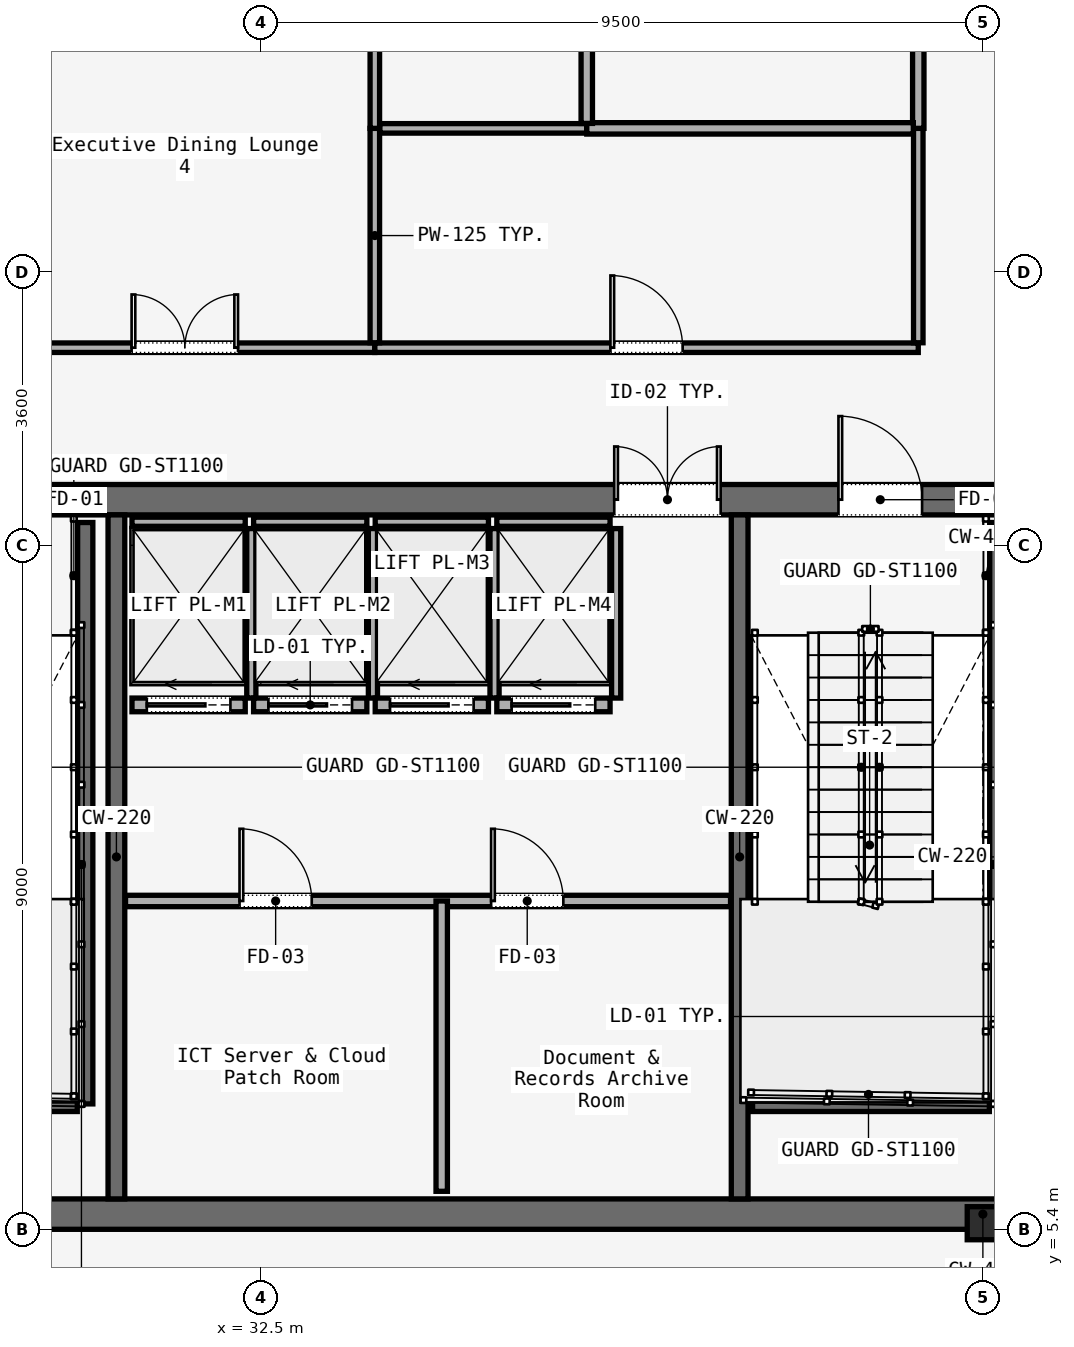
"""IFC4 building model, lengths in metres.
Left out: names, types, materials, properties, quantities, classifications, styles, units other than length and angle.
Written with IfcOpenShell. Run it as: python <this file> out.ifc"""

import sys

from ifc_helpers import new_model, si_unit, direction, frame, frame_2d, origin, origin_2d, place, context, subcontext, project, spatial, rectangle, i_section, extrude, element, fill, save


model = new_model("IFC4")
c1 = context("Model", 3, precision=1e-05, world=origin(), true_north=direction((0.0, 1.0)))
c2 = subcontext(c1, "Body", "Model", "MODEL_VIEW")
j1 = project(units=[si_unit("LENGTHUNIT", "METRE"), si_unit("PLANEANGLEUNIT", "RADIAN")], contexts=[c1])
p1 = place(None, origin())
s1 = spatial("IfcSite", under=j1, at=p1, CompositionType="ELEMENT")
p2 = place(p1, origin())
s2 = spatial("IfcBuilding", under=s1, at=p2, CompositionType="ELEMENT")
p3 = place(p2, frame((0.0, 0.0, 208.4)))
s3 = spatial("IfcBuildingStorey", under=s2, at=p3, CompositionType="ELEMENT", Elevation=208.4)
p4 = place(p3, frame((26.45, 15.0, 0.0), z_axis=(0.0, 0.0, 1.0), x_axis=(1.0, 0.0, 0.0)))
e1 = element("IfcWall", 1, at=p4, inside=s3, PredefinedType="SOLIDWALL", context=c2, shape_type="SweptSolid", body=[
    extrude(rectangle(XDim=31.1, YDim=0.4, at=frame_2d((15.55, 0.0))), origin(), (0.0, 0.0, 1.0), 4.52),
])
p5 = place(p4, frame((1.65, 0.0, 0.0)))
e2 = element("IfcOpeningElement", 2, at=p5, cuts=e1, PredefinedType="OPENING", context=c2, shape_type="SweptSolid", body=[
    extrude(rectangle(XDim=1.1, YDim=2.2, at=frame_2d((0.55, 1.1))), frame((0.0, 0.2, 0.0), z_axis=(0.0, -1.0, 0.0), x_axis=(1.0, 0.0, 0.0)), (0.0, 0.0, 1.0), 0.4),
])
p6 = place(p4, frame((13.65, 0.0, 0.0)))
e3 = element("IfcOpeningElement", 3, at=p6, cuts=e1, PredefinedType="OPENING", context=c2, shape_type="SweptSolid", body=[
    extrude(rectangle(XDim=1.1, YDim=2.2, at=frame_2d((0.55, 1.1))), frame((0.0, 0.2, 0.0), z_axis=(0.0, -1.0, 0.0), x_axis=(1.0, 0.0, 0.0)), (0.0, 0.0, 1.0), 0.4),
])
p7 = place(p4, frame((25.55, 0.0, 0.0)))
e4 = element("IfcOpeningElement", 4, at=p7, cuts=e1, PredefinedType="OPENING", context=c2, shape_type="SweptSolid", body=[
    extrude(rectangle(XDim=1.1, YDim=2.2, at=frame_2d((0.55, 1.1))), frame((0.0, 0.2, 0.0), z_axis=(0.0, -1.0, 0.0), x_axis=(1.0, 0.0, 0.0)), (0.0, 0.0, 1.0), 0.4),
])
p8 = place(p4, frame((10.7, 0.0, 0.0)))
e5 = element("IfcOpeningElement", 5, at=p8, cuts=e1, PredefinedType="OPENING", context=c2, shape_type="SweptSolid", body=[
    extrude(rectangle(XDim=1.4, YDim=2.2, at=frame_2d((0.7, 1.1))), frame((0.0, 0.2, 0.0), z_axis=(0.0, -1.0, 0.0), x_axis=(1.0, 0.0, 0.0)), (0.0, 0.0, 1.0), 0.4),
])
p9 = place(p4, frame((19.35, 0.0, 0.0)))
e6 = element("IfcOpeningElement", 6, at=p9, cuts=e1, PredefinedType="OPENING", context=c2, shape_type="SweptSolid", body=[
    extrude(rectangle(XDim=1.1, YDim=2.2, at=frame_2d((0.55, 1.1))), frame((0.0, 0.2, 0.0), z_axis=(0.0, -1.0, 0.0), x_axis=(1.0, 0.0, 0.0)), (0.0, 0.0, 1.0), 0.4),
])
p10 = place(p4, frame((21.4, 0.0, 0.0)))
e7 = element("IfcOpeningElement", 7, at=p10, cuts=e1, PredefinedType="OPENING", context=c2, shape_type="SweptSolid", body=[
    extrude(rectangle(XDim=0.9, YDim=2.1, at=frame_2d((0.45, 1.05))), frame((0.0, 0.2, 0.0), z_axis=(0.0, -1.0, 0.0), x_axis=(1.0, 0.0, 0.0)), (0.0, 0.0, 1.0), 0.4),
])
p11 = place(p4, frame((23.35, 0.0, 0.0)))
e8 = element("IfcOpeningElement", 8, at=p11, cuts=e1, PredefinedType="OPENING", context=c2, shape_type="SweptSolid", body=[
    extrude(rectangle(XDim=1.3, YDim=2.3, at=frame_2d((0.65, 1.15))), frame((0.0, 0.2, 0.0), z_axis=(0.0, -1.0, 0.0), x_axis=(1.0, 0.0, 0.0)), (0.0, 0.0, 1.0), 0.4),
])
p12 = place(p3, frame((26.45, 5.6, 0.0), z_axis=(0.0, 0.0, 1.0), x_axis=(1.0, 0.0, 0.0)))
e9 = element("IfcWall", 9, at=p12, inside=s3, PredefinedType="SOLIDWALL", context=c2, shape_type="SweptSolid", body=[
    extrude(rectangle(XDim=31.1, YDim=0.4, at=frame_2d((15.55, 0.0))), origin(), (0.0, 0.0, 1.0), 4.52),
])
for number, where, z_axis, x_axis in (
    (10, (30.6, 5.8, 0.0), (0.0, 0.0, 1.0), (0.0, 1.0, 0.0)),
    (11, (38.8, 5.8, 0.0), (0.0, 0.0, 1.0), (0.0, 1.0, 0.0)),
):
    element("IfcWall", number, at=place(p3, frame(where, z_axis=z_axis, x_axis=x_axis)), inside=s3, PredefinedType="SOLIDWALL", context=c2, shape_type="SweptSolid", body=[
        extrude(rectangle(XDim=9.0, YDim=0.22, at=frame_2d((4.5, 0.0))), origin(), (0.0, 0.0, 1.0), 4.52),
    ])
p13 = place(p3, frame((42.0, 5.48, 0.0), z_axis=(0.0, 0.0, 1.0), x_axis=(1.0, 0.0, 0.0)))
e12 = element("IfcColumn", 12, at=p13, inside=s3, PredefinedType="COLUMN", context=c2, shape_type="SweptSolid", body=[
    extrude(i_section(OverallWidth=0.412, OverallDepth=0.435, WebThickness=0.036, FlangeThickness=0.044, FilletRadius=0.015, at=origin_2d()), origin(), (0.0, 0.0, 1.0), 4.52),
])
p14 = place(p3, frame((30.19, 14.7, 0.0), z_axis=(0.0, 0.0, 1.0), x_axis=(0.0, -1.0, 0.0)))
e13 = element("IfcWall", 13, at=p14, inside=s3, PredefinedType="SOLIDWALL", context=c2, shape_type="SweptSolid", body=[
    extrude(rectangle(XDim=7.65, YDim=0.2, at=frame_2d((3.825, 0.0))), origin(), (0.0, 0.0, 1.0), 4.8),
])
p15 = place(p3, frame((26.97, 7.05, 0.0), z_axis=(0.0, 0.0, 1.0), x_axis=(1.0, 0.0, 0.0)))
e14 = element("IfcWall", 14, at=p15, inside=s3, PredefinedType="SOLIDWALL", context=c2, shape_type="SweptSolid", body=[
    extrude(rectangle(XDim=3.115, YDim=0.2, at=frame_2d((1.558, 0.0))), origin(), (0.0, 0.0, 1.0), 4.8),
])
p16 = place(p3, frame((42.19, 14.7, 0.0), z_axis=(0.0, 0.0, 1.0), x_axis=(0.0, -1.0, 0.0)))
e15 = element("IfcWall", 15, at=p16, inside=s3, PredefinedType="SOLIDWALL", context=c2, shape_type="SweptSolid", body=[
    extrude(rectangle(XDim=7.65, YDim=0.2, at=frame_2d((3.825, 0.0))), origin(), (0.0, 0.0, 1.0), 4.8),
])
p17 = place(p3, frame((38.97, 7.05, 0.0), z_axis=(0.0, 0.0, 1.0), x_axis=(1.0, 0.0, 0.0)))
e16 = element("IfcWall", 16, at=p17, inside=s3, PredefinedType="SOLIDWALL", context=c2, shape_type="SweptSolid", body=[
    extrude(rectangle(XDim=3.115, YDim=0.2, at=frame_2d((1.558, 0.0))), origin(), (0.0, 0.0, 1.0), 4.8),
])
p18 = place(p3, frame((30.72, 9.72, 0.0), z_axis=(0.0, 0.0, 1.0), x_axis=(1.0, 0.0, 0.0)))
e17 = element("IfcWall", 17, at=p18, inside=s3, PredefinedType="PARTITIONING", context=c2, shape_type="SweptSolid", body=[
    extrude(rectangle(XDim=7.96, YDim=0.15, at=frame_2d((3.98, 0.0))), origin(), (0.0, 0.0, 1.0), 3.39),
])
p19 = place(p18, frame((1.5, 0.0, 0.0)))
e18 = element("IfcOpeningElement", 18, at=p19, cuts=e17, PredefinedType="OPENING", context=c2, shape_type="SweptSolid", body=[
    extrude(rectangle(XDim=0.95, YDim=2.2, at=frame_2d((0.475, 1.1))), frame((0.0, 0.075, 0.0), z_axis=(0.0, -1.0, 0.0), x_axis=(1.0, 0.0, 0.0)), (0.0, 0.0, 1.0), 0.15),
])
p20 = place(p18, frame((4.81, 0.0, 0.0)))
e19 = element("IfcOpeningElement", 19, at=p20, cuts=e17, PredefinedType="OPENING", context=c2, shape_type="SweptSolid", body=[
    extrude(rectangle(XDim=0.95, YDim=2.2, at=frame_2d((0.475, 1.1))), frame((0.0, 0.075, 0.0), z_axis=(0.0, -1.0, 0.0), x_axis=(1.0, 0.0, 0.0)), (0.0, 0.0, 1.0), 0.15),
])
p21 = place(p3, frame((34.88, 5.9, 0.0), z_axis=(0.0, 0.0, 1.0), x_axis=(0.0, 1.0, 0.0)))
e20 = element("IfcWall", 20, at=p21, inside=s3, PredefinedType="PARTITIONING", context=c2, shape_type="SweptSolid", body=[
    extrude(rectangle(XDim=3.82, YDim=0.15, at=frame_2d((1.91, 0.0))), origin(), (0.0, 0.0, 1.0), 3.39),
])
p22 = place(p3, frame((30.805, 12.3, 0.0), z_axis=(0.0, 0.0, 1.0), x_axis=(1.0, 0.0, 0.0)))
e21 = element("IfcWall", 21, at=p22, inside=s3, PredefinedType="SOLIDWALL", context=c2, shape_type="SweptSolid", body=[
    extrude(rectangle(XDim=1.49, YDim=0.18, at=frame_2d((0.745, 0.0))), origin(), (0.0, 0.0, 1.0), 3.39),
])
p23 = place(p22, frame((0.195, 0.0, 0.0)))
e22 = element("IfcOpeningElement", 22, at=p23, cuts=e21, PredefinedType="OPENING", context=c2, shape_type="SweptSolid", body=[
    extrude(rectangle(XDim=1.1, YDim=2.2, at=frame_2d((0.55, 1.1))), frame((0.0, 0.09, 0.0), z_axis=(0.0, -1.0, 0.0), x_axis=(1.0, 0.0, 0.0)), (0.0, 0.0, 1.0), 0.18),
])
p24 = place(p3, frame((30.805, 14.71, 0.0), z_axis=(0.0, 0.0, 1.0), x_axis=(1.0, 0.0, 0.0)))
e23 = element("IfcWall", 23, at=p24, inside=s3, PredefinedType="SOLIDWALL", context=c2, shape_type="SweptSolid", body=[
    extrude(rectangle(XDim=1.49, YDim=0.12, at=frame_2d((0.745, 0.0))), origin(), (0.0, 0.0, 1.0), 3.39),
])
p25 = place(p3, frame((32.375, 12.39, 0.0), z_axis=(0.0, 0.0, 1.0), x_axis=(0.0, 1.0, 0.0)))
e24 = element("IfcWall", 24, at=p25, inside=s3, PredefinedType="SOLIDWALL", context=c2, shape_type="SweptSolid", body=[
    extrude(rectangle(XDim=2.23, YDim=0.12, at=frame_2d((1.115, 0.0))), origin(), (0.0, 0.0, 1.0), 3.39),
])
p26 = place(p3, frame((32.405, 12.3, 0.0), z_axis=(0.0, 0.0, 1.0), x_axis=(1.0, 0.0, 0.0)))
e25 = element("IfcWall", 25, at=p26, inside=s3, PredefinedType="SOLIDWALL", context=c2, shape_type="SweptSolid", body=[
    extrude(rectangle(XDim=1.49, YDim=0.18, at=frame_2d((0.745, 0.0))), origin(), (0.0, 0.0, 1.0), 3.39),
])
p27 = place(p26, frame((0.195, 0.0, 0.0)))
e26 = element("IfcOpeningElement", 26, at=p27, cuts=e25, PredefinedType="OPENING", context=c2, shape_type="SweptSolid", body=[
    extrude(rectangle(XDim=1.1, YDim=2.2, at=frame_2d((0.55, 1.1))), frame((0.0, 0.09, 0.0), z_axis=(0.0, -1.0, 0.0), x_axis=(1.0, 0.0, 0.0)), (0.0, 0.0, 1.0), 0.18),
])
p28 = place(p3, frame((32.405, 14.71, 0.0), z_axis=(0.0, 0.0, 1.0), x_axis=(1.0, 0.0, 0.0)))
e27 = element("IfcWall", 27, at=p28, inside=s3, PredefinedType="SOLIDWALL", context=c2, shape_type="SweptSolid", body=[
    extrude(rectangle(XDim=1.49, YDim=0.12, at=frame_2d((0.745, 0.0))), origin(), (0.0, 0.0, 1.0), 3.39),
])
p29 = place(p3, frame((33.975, 12.39, 0.0), z_axis=(0.0, 0.0, 1.0), x_axis=(0.0, 1.0, 0.0)))
e28 = element("IfcWall", 28, at=p29, inside=s3, PredefinedType="SOLIDWALL", context=c2, shape_type="SweptSolid", body=[
    extrude(rectangle(XDim=2.23, YDim=0.12, at=frame_2d((1.115, 0.0))), origin(), (0.0, 0.0, 1.0), 3.39),
])
p30 = place(p3, frame((34.005, 12.3, 0.0), z_axis=(0.0, 0.0, 1.0), x_axis=(1.0, 0.0, 0.0)))
e29 = element("IfcWall", 29, at=p30, inside=s3, PredefinedType="SOLIDWALL", context=c2, shape_type="SweptSolid", body=[
    extrude(rectangle(XDim=1.49, YDim=0.18, at=frame_2d((0.745, 0.0))), origin(), (0.0, 0.0, 1.0), 3.39),
])
p31 = place(p30, frame((0.195, 0.0, 0.0)))
e30 = element("IfcOpeningElement", 30, at=p31, cuts=e29, PredefinedType="OPENING", context=c2, shape_type="SweptSolid", body=[
    extrude(rectangle(XDim=1.1, YDim=2.2, at=frame_2d((0.55, 1.1))), frame((0.0, 0.09, 0.0), z_axis=(0.0, -1.0, 0.0), x_axis=(1.0, 0.0, 0.0)), (0.0, 0.0, 1.0), 0.18),
])
p32 = place(p3, frame((34.005, 14.71, 0.0), z_axis=(0.0, 0.0, 1.0), x_axis=(1.0, 0.0, 0.0)))
e31 = element("IfcWall", 31, at=p32, inside=s3, PredefinedType="SOLIDWALL", context=c2, shape_type="SweptSolid", body=[
    extrude(rectangle(XDim=1.49, YDim=0.12, at=frame_2d((0.745, 0.0))), origin(), (0.0, 0.0, 1.0), 3.39),
])
p33 = place(p3, frame((35.575, 12.39, 0.0), z_axis=(0.0, 0.0, 1.0), x_axis=(0.0, 1.0, 0.0)))
e32 = element("IfcWall", 32, at=p33, inside=s3, PredefinedType="SOLIDWALL", context=c2, shape_type="SweptSolid", body=[
    extrude(rectangle(XDim=2.23, YDim=0.12, at=frame_2d((1.115, 0.0))), origin(), (0.0, 0.0, 1.0), 3.39),
])
p34 = place(p3, frame((35.605, 12.3, 0.0), z_axis=(0.0, 0.0, 1.0), x_axis=(1.0, 0.0, 0.0)))
e33 = element("IfcWall", 33, at=p34, inside=s3, PredefinedType="SOLIDWALL", context=c2, shape_type="SweptSolid", body=[
    extrude(rectangle(XDim=1.49, YDim=0.18, at=frame_2d((0.745, 0.0))), origin(), (0.0, 0.0, 1.0), 3.39),
])
p35 = place(p34, frame((0.195, 0.0, 0.0)))
e34 = element("IfcOpeningElement", 34, at=p35, cuts=e33, PredefinedType="OPENING", context=c2, shape_type="SweptSolid", body=[
    extrude(rectangle(XDim=1.1, YDim=2.2, at=frame_2d((0.55, 1.1))), frame((0.0, 0.09, 0.0), z_axis=(0.0, -1.0, 0.0), x_axis=(1.0, 0.0, 0.0)), (0.0, 0.0, 1.0), 0.18),
])
p36 = place(p3, frame((35.605, 14.71, 0.0), z_axis=(0.0, 0.0, 1.0), x_axis=(1.0, 0.0, 0.0)))
e35 = element("IfcWall", 35, at=p36, inside=s3, PredefinedType="SOLIDWALL", context=c2, shape_type="SweptSolid", body=[
    extrude(rectangle(XDim=1.49, YDim=0.12, at=frame_2d((0.745, 0.0))), origin(), (0.0, 0.0, 1.0), 3.39),
])
p37 = place(p3, frame((37.175, 12.39, 0.0), z_axis=(0.0, 0.0, 1.0), x_axis=(0.0, 1.0, 0.0)))
e36 = element("IfcWall", 36, at=p37, inside=s3, PredefinedType="SOLIDWALL", context=c2, shape_type="SweptSolid", body=[
    extrude(rectangle(XDim=2.23, YDim=0.12, at=frame_2d((1.115, 0.0))), origin(), (0.0, 0.0, 1.0), 3.39),
])
p38 = place(p3, frame((29.0, 17.0, 0.0), z_axis=(0.0, 0.0, 1.0), x_axis=(1.0, 0.0, 0.0)))
e37 = element("IfcWall", 37, at=p38, inside=s3, PredefinedType="PARTITIONING", context=c2, shape_type="SweptSolid", body=[
    extrude(rectangle(XDim=5.0, YDim=0.125, at=frame_2d((2.5, 0.0))), origin(), (0.0, 0.0, 1.0), 3.39),
])
p39 = place(p38, frame((1.8, 0.0, 0.0)))
e38 = element("IfcOpeningElement", 38, at=p39, cuts=e37, PredefinedType="OPENING", context=c2, shape_type="SweptSolid", body=[
    extrude(rectangle(XDim=1.4, YDim=2.2, at=frame_2d((0.7, 1.1))), frame((0.0, 0.062, 0.0), z_axis=(0.0, -1.0, 0.0), x_axis=(1.0, 0.0, 0.0)), (0.0, 0.0, 1.0), 0.125),
])
p40 = place(p3, frame((34.0, 17.0, 0.0), z_axis=(0.0, 0.0, 1.0), x_axis=(1.0, 0.0, 0.0)))
e39 = element("IfcWall", 39, at=p40, inside=s3, PredefinedType="PARTITIONING", context=c2, shape_type="SweptSolid", body=[
    extrude(rectangle(XDim=7.15, YDim=0.125, at=frame_2d((3.575, 0.0))), origin(), (0.0, 0.0, 1.0), 3.39),
])
p41 = place(p40, frame((3.1, 0.0, 0.0)))
e40 = element("IfcOpeningElement", 40, at=p41, cuts=e39, PredefinedType="OPENING", context=c2, shape_type="SweptSolid", body=[
    extrude(rectangle(XDim=0.95, YDim=2.2, at=frame_2d((0.475, 1.1))), frame((0.0, 0.062, 0.0), z_axis=(0.0, -1.0, 0.0), x_axis=(1.0, 0.0, 0.0)), (0.0, 0.0, 1.0), 0.125),
])
p42 = place(p3, frame((41.15, 17.065, 0.0), z_axis=(0.0, 0.0, 1.0), x_axis=(0.0, 1.0, 0.0)))
e41 = element("IfcWall", 41, at=p42, inside=s3, PredefinedType="PARTITIONING", context=c2, shape_type="SweptSolid", body=[
    extrude(rectangle(XDim=2.821, YDim=0.125, at=frame_2d((1.411, 0.0))), origin(), (0.0, 0.0, 1.0), 3.39),
])
p43 = place(p3, frame((41.15, 19.886, 0.0), z_axis=(0.0, 0.0, 1.0), x_axis=(0.0, 1.0, 0.0)))
e42 = element("IfcWall", 42, at=p43, inside=s3, PredefinedType="PARTITIONING", context=c2, shape_type="SweptSolid", body=[
    extrude(rectangle(XDim=4.514, YDim=0.15, at=frame_2d((2.257, 0.0))), origin(), (0.0, 0.0, 1.0), 3.39),
])
p44 = place(p43, frame((1.807, 0.0, 0.0)))
e43 = element("IfcOpeningElement", 43, at=p44, cuts=e42, PredefinedType="OPENING", context=c2, shape_type="SweptSolid", body=[
    extrude(rectangle(XDim=0.9, YDim=2.15, at=frame_2d((0.45, 1.075))), frame((0.0, 0.075, 0.0), z_axis=(0.0, -1.0, 0.0), x_axis=(1.0, 0.0, 0.0)), (0.0, 0.0, 1.0), 0.15),
])
p45 = place(p3, frame((34.0, 17.065, 0.0), z_axis=(0.0, 0.0, 1.0), x_axis=(0.0, 1.0, 0.0)))
e44 = element("IfcWall", 44, at=p45, inside=s3, PredefinedType="PARTITIONING", context=c2, shape_type="SweptSolid", body=[
    extrude(rectangle(XDim=2.821, YDim=0.125, at=frame_2d((1.411, 0.0))), origin(), (0.0, 0.0, 1.0), 3.39),
])
p46 = place(p3, frame((34.065, 19.886, 0.0), z_axis=(0.0, 0.0, 1.0), x_axis=(1.0, 0.0, 0.0)))
e45 = element("IfcWall", 45, at=p46, inside=s3, PredefinedType="PARTITIONING", context=c2, shape_type="SweptSolid", body=[
    extrude(rectangle(XDim=2.724, YDim=0.125, at=frame_2d((1.362, 0.0))), origin(), (0.0, 0.0, 1.0), 3.39),
])
p47 = place(p3, frame((36.789, 19.886, 0.0), z_axis=(0.0, 0.0, 1.0), x_axis=(1.0, 0.0, 0.0)))
e46 = element("IfcWall", 46, at=p47, inside=s3, PredefinedType="PARTITIONING", context=c2, shape_type="SweptSolid", body=[
    extrude(rectangle(XDim=4.296, YDim=0.15, at=frame_2d((2.148, 0.0))), origin(), (0.0, 0.0, 1.0), 3.39),
])
p48 = place(p3, frame((34.0, 21.075, 0.0), z_axis=(0.0, 0.0, 1.0), x_axis=(0.0, -1.0, 0.0)))
e47 = element("IfcWall", 47, at=p48, inside=s3, PredefinedType="PARTITIONING", context=c2, shape_type="SweptSolid", body=[
    extrude(rectangle(XDim=1.189, YDim=0.125, at=frame_2d((0.594, 0.0))), origin(), (0.0, 0.0, 1.0), 3.39),
])
p49 = place(p3, frame((36.789, 24.335, 0.0), z_axis=(0.0, 0.0, 1.0), x_axis=(0.0, -1.0, 0.0)))
e48 = element("IfcWall", 48, at=p49, inside=s3, PredefinedType="PARTITIONING", context=c2, shape_type="SweptSolid", body=[
    extrude(rectangle(XDim=4.384, YDim=0.15, at=frame_2d((2.192, 0.0))), origin(), (0.0, 0.0, 1.0), 3.39),
])
p50 = place(p6, origin())
e49 = element("IfcDoor", 49, at=p50, inside=s3, OperationType="SINGLE_SWING_RIGHT", PredefinedType="DOOR", context=c2, shape_type="SweptSolid", body=[
    extrude(rectangle(XDim=1.1, YDim=2.2, at=frame_2d((0.55, 1.1))), frame((0.0, 0.025, 0.0), z_axis=(0.0, -1.0, 0.0), x_axis=(1.0, 0.0, 0.0)), (0.0, 0.0, 1.0), 0.05),
])
fill(e3, e49)
p51 = place(p8, origin())
e50 = element("IfcDoor", 50, at=p51, inside=s3, OperationType="DOUBLE_DOOR_SINGLE_SWING", PredefinedType="DOOR", context=c2, shape_type="SweptSolid", body=[
    extrude(rectangle(XDim=1.4, YDim=2.2, at=frame_2d((0.7, 1.1))), frame((0.0, 0.025, 0.0), z_axis=(0.0, -1.0, 0.0), x_axis=(1.0, 0.0, 0.0)), (0.0, 0.0, 1.0), 0.05),
])
fill(e5, e50)
p52 = place(p19, origin())
e51 = element("IfcDoor", 51, at=p52, inside=s3, OperationType="SINGLE_SWING_LEFT", PredefinedType="DOOR", context=c2, shape_type="SweptSolid", body=[
    extrude(rectangle(XDim=0.95, YDim=2.2, at=frame_2d((0.475, 1.1))), frame((0.0, 0.025, 0.0), z_axis=(0.0, -1.0, 0.0), x_axis=(1.0, 0.0, 0.0)), (0.0, 0.0, 1.0), 0.05),
])
fill(e18, e51)
p53 = place(p20, origin())
e52 = element("IfcDoor", 52, at=p53, inside=s3, OperationType="SINGLE_SWING_RIGHT", PredefinedType="DOOR", context=c2, shape_type="SweptSolid", body=[
    extrude(rectangle(XDim=0.95, YDim=2.2, at=frame_2d((0.475, 1.1))), frame((0.0, 0.025, 0.0), z_axis=(0.0, -1.0, 0.0), x_axis=(1.0, 0.0, 0.0)), (0.0, 0.0, 1.0), 0.05),
])
fill(e19, e52)
p54 = place(p23, origin())
e53 = element("IfcDoor", 53, at=p54, inside=s3, OperationType="SLIDING_TO_LEFT", PredefinedType="DOOR", context=c2, shape_type="SweptSolid", body=[
    extrude(rectangle(XDim=1.1, YDim=2.2, at=frame_2d((0.55, 1.1))), frame((0.0, 0.025, 0.0), z_axis=(0.0, -1.0, 0.0), x_axis=(1.0, 0.0, 0.0)), (0.0, 0.0, 1.0), 0.05),
])
fill(e22, e53)
p55 = place(p27, origin())
e54 = element("IfcDoor", 54, at=p55, inside=s3, OperationType="SLIDING_TO_LEFT", PredefinedType="DOOR", context=c2, shape_type="SweptSolid", body=[
    extrude(rectangle(XDim=1.1, YDim=2.2, at=frame_2d((0.55, 1.1))), frame((0.0, 0.025, 0.0), z_axis=(0.0, -1.0, 0.0), x_axis=(1.0, 0.0, 0.0)), (0.0, 0.0, 1.0), 0.05),
])
fill(e26, e54)
p56 = place(p31, origin())
e55 = element("IfcDoor", 55, at=p56, inside=s3, OperationType="SLIDING_TO_LEFT", PredefinedType="DOOR", context=c2, shape_type="SweptSolid", body=[
    extrude(rectangle(XDim=1.1, YDim=2.2, at=frame_2d((0.55, 1.1))), frame((0.0, 0.025, 0.0), z_axis=(0.0, -1.0, 0.0), x_axis=(1.0, 0.0, 0.0)), (0.0, 0.0, 1.0), 0.05),
])
fill(e30, e55)
p57 = place(p35, origin())
e56 = element("IfcDoor", 56, at=p57, inside=s3, OperationType="SLIDING_TO_LEFT", PredefinedType="DOOR", context=c2, shape_type="SweptSolid", body=[
    extrude(rectangle(XDim=1.1, YDim=2.2, at=frame_2d((0.55, 1.1))), frame((0.0, 0.025, 0.0), z_axis=(0.0, -1.0, 0.0), x_axis=(1.0, 0.0, 0.0)), (0.0, 0.0, 1.0), 0.05),
])
fill(e34, e56)
p58 = place(p41, origin())
e57 = element("IfcDoor", 57, at=p58, inside=s3, OperationType="SINGLE_SWING_RIGHT", PredefinedType="DOOR", context=c2, shape_type="SweptSolid", body=[
    extrude(rectangle(XDim=0.95, YDim=2.2, at=frame_2d((0.475, 1.1))), frame((0.0, 0.025, 0.0), z_axis=(0.0, -1.0, 0.0), x_axis=(1.0, 0.0, 0.0)), (0.0, 0.0, 1.0), 0.05),
])
fill(e40, e57)
p59 = place(p39, origin())
e58 = element("IfcDoor", 58, at=p59, inside=s3, OperationType="SINGLE_SWING_LEFT", PredefinedType="DOOR", context=c2, shape_type="SweptSolid", body=[
    extrude(rectangle(XDim=1.4, YDim=2.2, at=frame_2d((0.7, 1.1))), frame((0.0, 0.025, 0.0), z_axis=(0.0, -1.0, 0.0), x_axis=(1.0, 0.0, 0.0)), (0.0, 0.0, 1.0), 0.05),
])
fill(e38, e58)
save(model, sys.argv[1])
